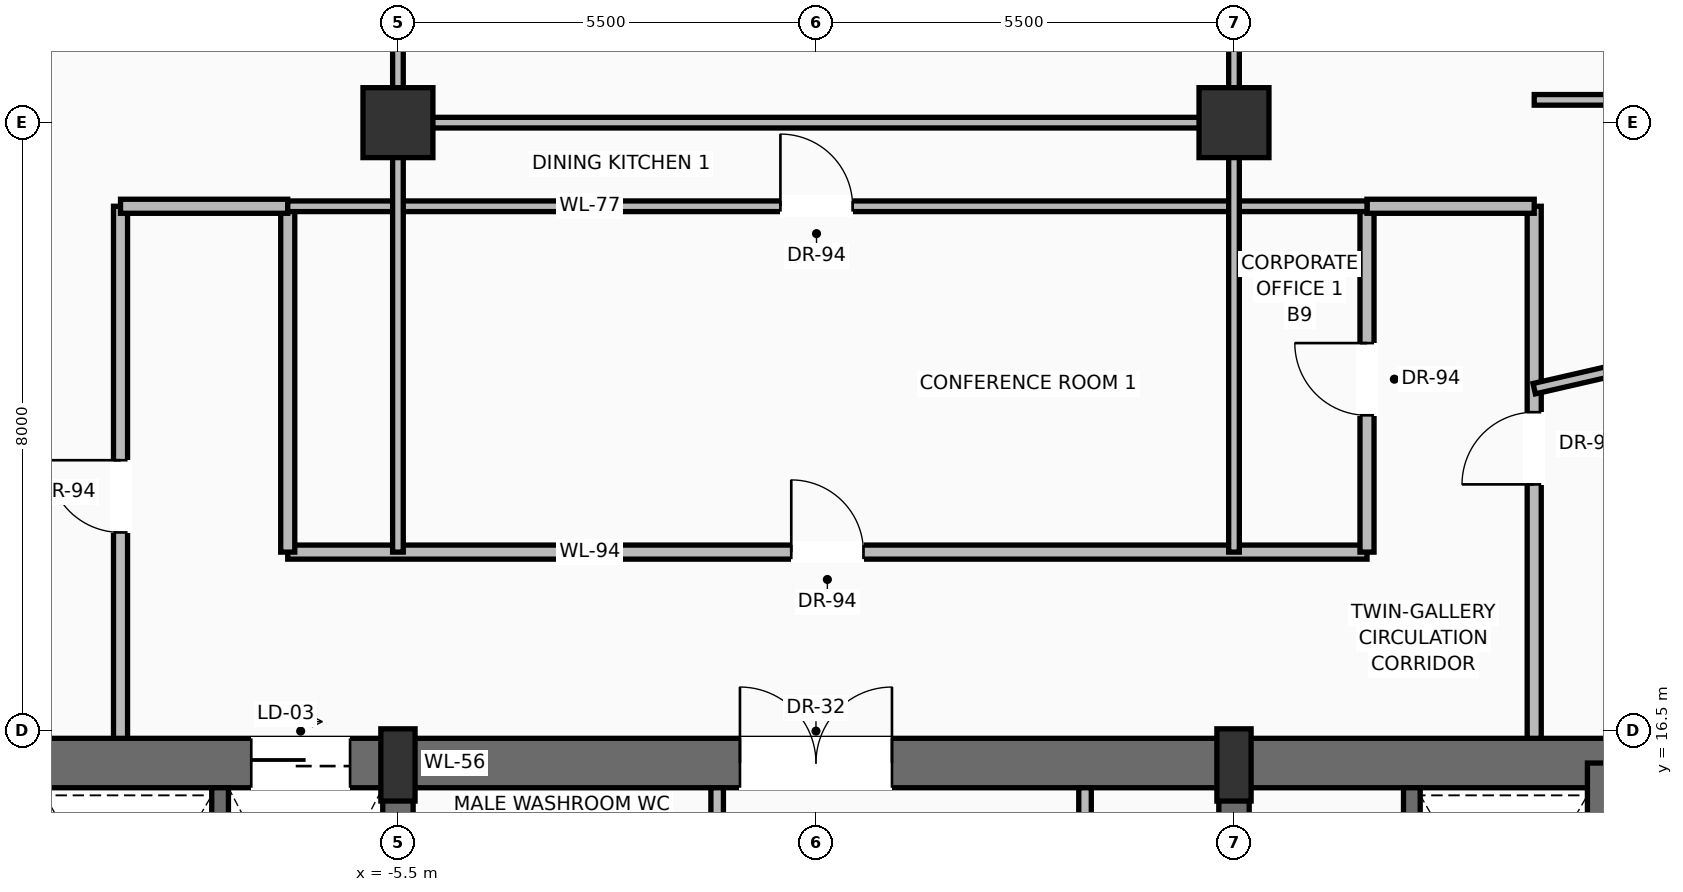
"""IFC4 building model, lengths in metres.
Left out: names, types, materials, properties, quantities, classifications, styles, units other than length and angle.
Written with IfcOpenShell. Run it as: python <this file> out.ifc"""

import sys

from ifc_helpers import new_model, si_unit, direction, frame, frame_2d, origin, origin_2d, place, context, subcontext, project, spatial, rectangle, extrude, source, transform, mapped, element, fill, save


model = new_model("IFC4")
c1 = context("Model", 3, precision=1e-05, world=origin(), true_north=direction((0.0, 1.0)))
c2 = subcontext(c1, "Body", "Model", "MODEL_VIEW")
j1 = project(units=[si_unit("LENGTHUNIT", "METRE"), si_unit("PLANEANGLEUNIT", "RADIAN")], contexts=[c1])
p1 = place(None, origin())
s1 = spatial("IfcSite", under=j1, at=p1, CompositionType="ELEMENT")
p2 = place(p1, origin())
s2 = spatial("IfcBuilding", under=s1, at=p2, CompositionType="ELEMENT")
p3 = place(p2, frame((0.0, 0.0, 185.8)))
s3 = spatial("IfcBuildingStorey", under=s2, at=p3, CompositionType="ELEMENT", Elevation=185.8)
p4 = place(p3, frame((-10.8, 16.075, 0.0), z_axis=(0.0, 0.0, 1.0), x_axis=(1.0, 0.0, 0.0)))
e1 = element("IfcWall", 1, at=p4, inside=s3, PredefinedType="SHEAR", context=c2, shape_type="SweptSolid", body=[
    extrude(rectangle(XDim=21.6, YDim=0.65, at=frame_2d((10.8, 0.0))), origin(), (0.0, 0.0, 1.0), 3.47),
])
p5 = place(p4, frame((3.37, 0.0, 0.0)))
e2 = element("IfcOpeningElement", 2, at=p5, cuts=e1, PredefinedType="OPENING", context=c2, shape_type="SweptSolid", body=[
    extrude(rectangle(XDim=1.3, YDim=2.3, at=frame_2d((0.65, 1.15))), frame((0.0, 0.335, 0.0), z_axis=(0.0, -1.0, 0.0), x_axis=(1.0, 0.0, 0.0)), (0.0, 0.0, 1.0), 0.67),
])
p6 = place(p4, frame((9.8, 0.0, 0.0)))
e3 = element("IfcOpeningElement", 3, at=p6, cuts=e1, PredefinedType="OPENING", context=c2, shape_type="SweptSolid", body=[
    extrude(rectangle(XDim=2.0, YDim=2.4, at=frame_2d((1.0, 1.2))), frame((0.0, 0.335, 0.0), z_axis=(0.0, -1.0, 0.0), x_axis=(1.0, 0.0, 0.0)), (0.0, 0.0, 1.0), 0.67),
])
p7 = place(p3, frame((10.475, 0.525, 0.0), z_axis=(0.0, 0.0, 1.0), x_axis=(0.0, 1.0, 0.0)))
e4 = element("IfcWall", 4, at=p7, inside=s3, PredefinedType="SHEAR", context=c2, shape_type="SweptSolid", body=[
    extrude(rectangle(XDim=15.55, YDim=0.65, at=frame_2d((7.775, 0.0))), origin(), (0.0, 0.0, 1.0), 3.47),
])
p8 = place(p3, frame((-5.5, 0.525, 0.0), z_axis=(0.0, 0.0, 1.0), x_axis=(0.0, 1.0, 0.0)))
e5 = element("IfcWall", 5, at=p8, inside=s3, PredefinedType="SHEAR", context=c2, shape_type="SweptSolid", body=[
    extrude(rectangle(XDim=15.55, YDim=0.4, at=frame_2d((7.775, 0.0))), origin(), (0.0, 0.0, 1.0), 3.47),
])
p9 = place(p8, frame((8.975, 0.0, 0.0)))
e6 = element("IfcOpeningElement", 6, at=p9, cuts=e5, PredefinedType="OPENING", context=c2, shape_type="SweptSolid", body=[
    extrude(rectangle(XDim=1.1, YDim=2.2, at=frame_2d((0.55, 1.1))), frame((0.0, 0.21, 0.0), z_axis=(0.0, -1.0, 0.0), x_axis=(1.0, 0.0, 0.0)), (0.0, 0.0, 1.0), 0.42),
])
p10 = place(p3, frame((5.5, 0.525, 0.0), z_axis=(0.0, 0.0, 1.0), x_axis=(0.0, 1.0, 0.0)))
e7 = element("IfcWall", 7, at=p10, inside=s3, PredefinedType="SHEAR", context=c2, shape_type="SweptSolid", body=[
    extrude(rectangle(XDim=15.55, YDim=0.4, at=frame_2d((7.775, 0.0))), origin(), (0.0, 0.0, 1.0), 3.47),
])
p11 = place(p10, frame((8.975, 0.0, 0.0)))
e8 = element("IfcOpeningElement", 8, at=p11, cuts=e7, PredefinedType="OPENING", context=c2, shape_type="SweptSolid", body=[
    extrude(rectangle(XDim=1.1, YDim=2.2, at=frame_2d((0.55, 1.1))), frame((0.0, 0.21, 0.0), z_axis=(0.0, -1.0, 0.0), x_axis=(1.0, 0.0, 0.0)), (0.0, 0.0, 1.0), 0.42),
])
m1 = source(origin(), c2, "Body", "SweptSolid", [
    extrude(rectangle(XDim=0.45, YDim=0.95, at=origin_2d()), origin(), (0.0, 0.0, 1.0), 3.7),
])
for number, where, z_axis, x_axis in (
    (9, (-5.5, 16.05, 0.0), (0.0, 0.0, 1.0), (1.0, 0.0, 0.0)),
    (10, (5.5, 16.05, 0.0), (0.0, 0.0, 1.0), (1.0, 0.0, 0.0)),
):
    element("IfcColumn", number, at=place(p3, frame(where, z_axis=z_axis, x_axis=x_axis)), inside=s3, PredefinedType="PILASTER", context=c2, shape_type="MappedRepresentation", body=[
        mapped(m1, transform((0.0, 0.0, 0.0), scale=1.0)),
    ])
m2 = source(origin(), c2, "Body", "SweptSolid", [
    extrude(rectangle(XDim=0.92, YDim=0.92, at=origin_2d()), origin(), (0.0, 0.0, 1.0), 3.7),
])
for number, where, z_axis, x_axis in (
    (11, (-5.5, 24.5, 0.0), (0.0, 0.0, 1.0), (1.0, 0.0, 0.0)),
    (12, (5.5, 24.5, 0.0), (0.0, 0.0, 1.0), (1.0, 0.0, 0.0)),
):
    element("IfcColumn", number, at=place(p3, frame(where, z_axis=z_axis, x_axis=x_axis)), inside=s3, PredefinedType="COLUMN", context=c2, shape_type="MappedRepresentation", body=[
        mapped(m2, transform((0.0, 0.0, 0.0), scale=1.0)),
    ])
p12 = place(p3, frame((9.943, 32.422, 0.0), z_axis=(0.0, 0.0, 1.0), x_axis=(0.535123469973, -0.844773858428, 0.0)))
e13 = element("IfcWall", 13, at=p12, inside=s3, PredefinedType="SOLIDWALL", context=c2, shape_type="SweptSolid", body=[
    extrude(rectangle(XDim=18.875, YDim=0.28, at=frame_2d((9.438, 0.0))), origin(), (0.0, 0.0, 1.0), 3.05),
])
p13 = place(p12, frame((4.53, 0.0, 0.0)))
e14 = element("IfcOpeningElement", 14, at=p13, cuts=e13, PredefinedType="OPENING", context=c2, shape_type="SweptSolid", body=[
    extrude(rectangle(XDim=1.6, YDim=2.35, at=frame_2d((0.8, 1.175))), frame((0.0, 0.15, 0.0), z_axis=(0.0, -1.0, 0.0), x_axis=(1.0, 0.0, 0.0)), (0.0, 0.0, 1.0), 0.3),
])
p14 = place(p12, frame((12.835, 0.0, 0.9)))
e15 = element("IfcOpeningElement", 15, at=p14, cuts=e13, PredefinedType="OPENING", context=c2, shape_type="SweptSolid", body=[
    extrude(rectangle(XDim=1.55, YDim=1.85, at=frame_2d((0.775, 0.925))), frame((0.0, 0.15, 0.0), z_axis=(0.0, -1.0, 0.0), x_axis=(1.0, 0.0, 0.0)), (0.0, 0.0, 1.0), 0.3),
])
for number, where, z_axis, x_axis in (
    (16, (-7.84, 11.87, 0.0), (0.0, 0.0, 1.0), (0.0, 1.0, 0.0)),
    (17, (7.84, 11.87, 0.0), (0.0, 0.0, 1.0), (0.0, 1.0, 0.0)),
):
    element("IfcWall", number, at=place(p3, frame(where, z_axis=z_axis, x_axis=x_axis)), inside=s3, PredefinedType="SOLIDWALL", context=c2, shape_type="SweptSolid", body=[
        extrude(rectangle(XDim=3.88, YDim=0.22, at=frame_2d((1.94, 0.0))), origin(), (0.0, 0.0, 1.0), 3.47),
    ])
p15 = place(p3, frame((-1.3, 13.6, 0.0), z_axis=(0.0, 0.0, 1.0), x_axis=(0.0, 1.0, 0.0)))
e18 = element("IfcWall", 18, at=p15, inside=s3, PredefinedType="PARTITIONING", context=c2, shape_type="SweptSolid", body=[
    extrude(rectangle(XDim=2.15, YDim=0.165, at=frame_2d((1.075, 0.0))), origin(), (0.0, 0.0, 1.0), 3.462),
])
p16 = place(p15, frame((0.55, 0.0, 0.0)))
e19 = element("IfcOpeningElement", 19, at=p16, cuts=e18, PredefinedType="OPENING", context=c2, shape_type="SweptSolid", body=[
    extrude(rectangle(XDim=0.9, YDim=2.1, at=frame_2d((0.45, 1.05))), frame((0.0, 0.093, 0.0), z_axis=(0.0, -1.0, 0.0), x_axis=(1.0, 0.0, 0.0)), (0.0, 0.0, 1.0), 0.185),
])
p17 = place(p3, frame((3.54, 11.22, 0.0), z_axis=(0.0, 0.0, 1.0), x_axis=(0.0, 1.0, 0.0)))
e20 = element("IfcWall", 20, at=p17, inside=s3, PredefinedType="PARTITIONING", context=c2, shape_type="SweptSolid", body=[
    extrude(rectangle(XDim=4.53, YDim=0.165, at=frame_2d((2.265, 0.0))), origin(), (0.0, 0.0, 1.0), 3.462),
])
p18 = place(p17, frame((1.25, 0.0, 0.0)))
e21 = element("IfcOpeningElement", 21, at=p18, cuts=e20, PredefinedType="OPENING", context=c2, shape_type="SweptSolid", body=[
    extrude(rectangle(XDim=0.9, YDim=2.1, at=frame_2d((0.45, 1.05))), frame((0.0, 0.093, 0.0), z_axis=(0.0, -1.0, 0.0), x_axis=(1.0, 0.0, 0.0)), (0.0, 0.0, 1.0), 0.185),
])
p19 = place(p3, frame((-6.95, 18.85, 0.0), z_axis=(0.0, 0.0, 1.0), x_axis=(1.0, 0.0, 0.0)))
e22 = element("IfcWall", 22, at=p19, inside=s3, PredefinedType="PARTITIONING", context=c2, shape_type="SweptSolid", body=[
    extrude(rectangle(XDim=14.2, YDim=0.185, at=frame_2d((7.1, 0.0))), origin(), (0.0, 0.0, 1.0), 2.846),
])
p20 = place(p19, frame((6.625, 0.0, 0.0)))
e23 = element("IfcOpeningElement", 23, at=p20, cuts=e22, PredefinedType="OPENING", context=c2, shape_type="SweptSolid", body=[
    extrude(rectangle(XDim=0.95, YDim=2.2, at=frame_2d((0.475, 1.1))), frame((0.0, 0.103, 0.0), z_axis=(0.0, -1.0, 0.0), x_axis=(1.0, 0.0, 0.0)), (0.0, 0.0, 1.0), 0.205),
])
p21 = place(p3, frame((-6.95, 18.85, 0.0), z_axis=(0.0, 0.0, 1.0), x_axis=(0.0, 1.0, 0.0)))
e24 = element("IfcWall", 24, at=p21, inside=s3, PredefinedType="PARTITIONING", context=c2, shape_type="SweptSolid", body=[
    extrude(rectangle(XDim=4.55, YDim=0.185, at=frame_2d((2.275, 0.0))), origin(), (0.0, 0.0, 1.0), 3.462),
])
p22 = place(p3, frame((7.25, 18.85, 0.0), z_axis=(0.0, 0.0, 1.0), x_axis=(0.0, 1.0, 0.0)))
e25 = element("IfcWall", 25, at=p22, inside=s3, PredefinedType="PARTITIONING", context=c2, shape_type="SweptSolid", body=[
    extrude(rectangle(XDim=4.55, YDim=0.185, at=frame_2d((2.275, 0.0))), origin(), (0.0, 0.0, 1.0), 3.462),
])
p23 = place(p22, frame((1.8, 0.0, 0.0)))
e26 = element("IfcOpeningElement", 26, at=p23, cuts=e25, PredefinedType="OPENING", context=c2, shape_type="SweptSolid", body=[
    extrude(rectangle(XDim=0.95, YDim=2.2, at=frame_2d((0.475, 1.1))), frame((0.0, 0.103, 0.0), z_axis=(0.0, -1.0, 0.0), x_axis=(1.0, 0.0, 0.0)), (0.0, 0.0, 1.0), 0.205),
])
p24 = place(p3, frame((-9.15, 16.4, 0.0), z_axis=(0.0, 0.0, 1.0), x_axis=(0.0, 1.0, 0.0)))
e27 = element("IfcWall", 27, at=p24, inside=s3, PredefinedType="PARTITIONING", context=c2, shape_type="SweptSolid", body=[
    extrude(rectangle(XDim=7.0, YDim=0.185, at=frame_2d((3.5, 0.0))), origin(), (0.0, 0.0, 1.0), 3.462),
])
p25 = place(p24, frame((2.709, 0.0, 0.0)))
e28 = element("IfcOpeningElement", 28, at=p25, cuts=e27, PredefinedType="OPENING", context=c2, shape_type="SweptSolid", body=[
    extrude(rectangle(XDim=0.95, YDim=2.2, at=frame_2d((0.475, 1.1))), frame((0.0, 0.103, 0.0), z_axis=(0.0, -1.0, 0.0), x_axis=(1.0, 0.0, 0.0)), (0.0, 0.0, 1.0), 0.205),
])
p26 = place(p3, frame((9.45, 16.4, 0.0), z_axis=(0.0, 0.0, 1.0), x_axis=(0.0, 1.0, 0.0)))
e29 = element("IfcWall", 29, at=p26, inside=s3, PredefinedType="PARTITIONING", context=c2, shape_type="SweptSolid", body=[
    extrude(rectangle(XDim=7.0, YDim=0.185, at=frame_2d((3.5, 0.0))), origin(), (0.0, 0.0, 1.0), 3.462),
])
p27 = place(p26, frame((3.341, 0.0, 0.0)))
e30 = element("IfcOpeningElement", 30, at=p27, cuts=e29, PredefinedType="OPENING", context=c2, shape_type="SweptSolid", body=[
    extrude(rectangle(XDim=0.95, YDim=2.2, at=frame_2d((0.475, 1.1))), frame((0.0, 0.103, 0.0), z_axis=(0.0, -1.0, 0.0), x_axis=(1.0, 0.0, 0.0)), (0.0, 0.0, 1.0), 0.205),
])
for number, where, z_axis, x_axis in (
    (31, (-9.15, 23.4, 0.0), (0.0, 0.0, 1.0), (1.0, 0.0, 0.0)),
    (32, (7.25, 23.4, 0.0), (0.0, 0.0, 1.0), (1.0, 0.0, 0.0)),
):
    element("IfcWall", number, at=place(p3, frame(where, z_axis=z_axis, x_axis=x_axis)), inside=s3, PredefinedType="PARTITIONING", context=c2, shape_type="SweptSolid", body=[
        extrude(rectangle(XDim=2.2, YDim=0.185, at=frame_2d((1.1, 0.0))), origin(), (0.0, 0.0, 1.0), 3.462),
    ])
p28 = place(p3, frame((-6.95, 23.4, 0.0), z_axis=(0.0, 0.0, 1.0), x_axis=(1.0, 0.0, 0.0)))
e33 = element("IfcWall", 33, at=p28, inside=s3, PredefinedType="PARTITIONING", context=c2, shape_type="SweptSolid", body=[
    extrude(rectangle(XDim=14.2, YDim=0.14, at=frame_2d((7.1, 0.0))), origin(), (0.0, 0.0, 1.0), 3.462),
])
p29 = place(p28, frame((6.482, 0.0, 0.0)))
e34 = element("IfcOpeningElement", 34, at=p29, cuts=e33, PredefinedType="OPENING", context=c2, shape_type="SweptSolid", body=[
    extrude(rectangle(XDim=0.95, YDim=2.2, at=frame_2d((0.475, 1.1))), frame((0.0, 0.08, 0.0), z_axis=(0.0, -1.0, 0.0), x_axis=(1.0, 0.0, 0.0)), (0.0, 0.0, 1.0), 0.16),
])
for number, where, z_axis, x_axis in (
    (35, (-5.5, 18.85, 0.0), (0.0, 0.0, 1.0), (0.0, 1.0, 0.0)),
    (36, (5.5, 18.85, 0.0), (0.0, 0.0, 1.0), (0.0, 1.0, 0.0)),
):
    element("IfcWall", number, at=place(p3, frame(where, z_axis=z_axis, x_axis=x_axis)), inside=s3, PredefinedType="PARTITIONING", context=c2, shape_type="SweptSolid", body=[
        extrude(rectangle(XDim=13.65, YDim=0.14, at=frame_2d((6.825, 0.0))), origin(), (0.0, 0.0, 1.0), 2.846),
    ])
p30 = place(p3, frame((-5.5, 24.5, 0.0), z_axis=(0.0, 0.0, 1.0), x_axis=(1.0, 0.0, 0.0)))
e37 = element("IfcWall", 37, at=p30, inside=s3, PredefinedType="PARTITIONING", context=c2, shape_type="SweptSolid", body=[
    extrude(rectangle(XDim=11.0, YDim=0.14, at=frame_2d((5.5, 0.0))), origin(), (0.0, 0.0, 1.0), 2.846),
])
p31 = place(p3, frame((9.45, 21.0, 0.0), z_axis=(0.0, 0.0, 1.0), x_axis=(0.974713024, 0.22346033394, 0.0)))
e38 = element("IfcWall", 38, at=p31, inside=s3, PredefinedType="PARTITIONING", context=c2, shape_type="SweptSolid", body=[
    extrude(rectangle(XDim=7.061, YDim=0.14, at=frame_2d((3.531, 0.0))), origin(), (0.0, 0.0, 1.0), 3.049),
])
p32 = place(p3, frame((9.45, 24.8, 0.0), z_axis=(0.0, 0.0, 1.0), x_axis=(1.0, 0.0, 0.0)))
e39 = element("IfcWall", 39, at=p32, inside=s3, PredefinedType="PARTITIONING", context=c2, shape_type="SweptSolid", body=[
    extrude(rectangle(XDim=5.475, YDim=0.14, at=frame_2d((2.737, 0.0))), origin(), (0.0, 0.0, 1.0), 3.462),
])
m3 = source(origin(), c2, "Body", "SweptSolid", [
    extrude(rectangle(XDim=1.3, YDim=2.3, at=frame_2d((0.65, 1.15))), frame((0.0, 0.025, 0.0), z_axis=(0.0, -1.0, 0.0), x_axis=(1.0, 0.0, 0.0)), (0.0, 0.0, 1.0), 0.05),
])
p33 = place(p5, origin())
e40 = element("IfcDoor", 40, at=p33, inside=s3, OperationType="SLIDING_TO_RIGHT", PredefinedType="DOOR", context=c2, shape_type="MappedRepresentation", body=[
    mapped(m3, transform((0.0, 0.0, 0.0), scale=1.0)),
])
fill(e2, e40)
m4 = source(origin(), c2, "Body", "SweptSolid", [
    extrude(rectangle(XDim=2.0, YDim=2.4, at=frame_2d((1.0, 1.2))), frame((0.0, 0.025, 0.0), z_axis=(0.0, -1.0, 0.0), x_axis=(1.0, 0.0, 0.0)), (0.0, 0.0, 1.0), 0.05),
])
p34 = place(p6, origin())
e41 = element("IfcDoor", 41, at=p34, inside=s3, OperationType="DOUBLE_DOOR_SINGLE_SWING", PredefinedType="DOOR", context=c2, shape_type="MappedRepresentation", body=[
    mapped(m4, transform((0.0, 0.0, 0.0), scale=1.0)),
])
fill(e3, e41)
m5 = source(origin(), c2, "Body", "SweptSolid", [
    extrude(rectangle(XDim=0.95, YDim=2.2, at=frame_2d((0.475, 1.1))), frame((0.0, 0.025, 0.0), z_axis=(0.0, -1.0, 0.0), x_axis=(1.0, 0.0, 0.0)), (0.0, 0.0, 1.0), 0.05),
])
p35 = place(p20, origin())
e42 = element("IfcDoor", 42, at=p35, inside=s3, OperationType="SINGLE_SWING_LEFT", PredefinedType="DOOR", context=c2, shape_type="MappedRepresentation", body=[
    mapped(m5, transform((0.0, 0.0, 0.0), scale=1.0)),
])
fill(e23, e42)
p36 = place(p25, origin())
e43 = element("IfcDoor", 43, at=p36, inside=s3, OperationType="SINGLE_SWING_RIGHT", PredefinedType="DOOR", context=c2, shape_type="MappedRepresentation", body=[
    mapped(m5, transform((0.0, 0.0, 0.0), scale=1.0)),
])
fill(e28, e43)
p37 = place(p27, origin())
e44 = element("IfcDoor", 44, at=p37, inside=s3, OperationType="SINGLE_SWING_LEFT", PredefinedType="DOOR", context=c2, shape_type="MappedRepresentation", body=[
    mapped(m5, transform((0.0, 0.0, 0.0), scale=1.0)),
])
fill(e30, e44)
p38 = place(p23, origin())
e45 = element("IfcDoor", 45, at=p38, inside=s3, OperationType="SINGLE_SWING_RIGHT", PredefinedType="DOOR", context=c2, shape_type="MappedRepresentation", body=[
    mapped(m5, transform((0.0, 0.0, 0.0), scale=1.0)),
])
fill(e26, e45)
p39 = place(p29, origin())
e46 = element("IfcDoor", 46, at=p39, inside=s3, OperationType="SINGLE_SWING_LEFT", PredefinedType="DOOR", context=c2, shape_type="MappedRepresentation", body=[
    mapped(m5, transform((0.0, 0.0, 0.0), scale=1.0)),
])
fill(e34, e46)
save(model, sys.argv[1])
